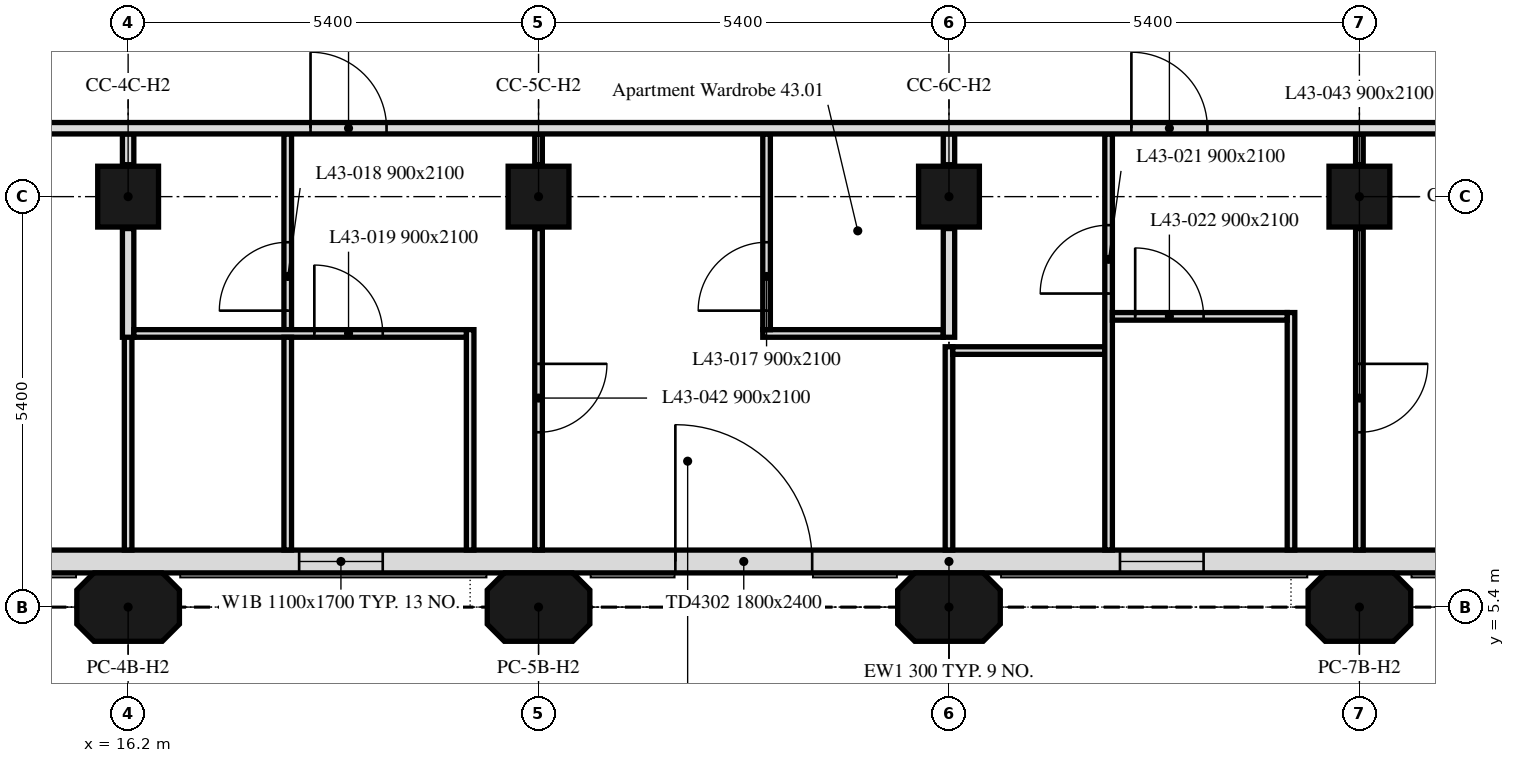
"""IFC4 building model, lengths in metres.
Left out: names, types, materials, properties, quantities, classifications, styles, units other than length and angle.
Written with IfcOpenShell. Run it as: python <this file> out.ifc"""

import sys

from ifc_helpers import new_model, si_unit, direction, frame, frame_2d, origin, origin_2d, place, context, subcontext, project, spatial, polyline, rectangle, outline, extrude, element, fill, save


model = new_model("IFC4")
c1 = context("Model", 3, precision=1e-05, world=origin(), true_north=direction((0.0, 1.0)))
c2 = subcontext(c1, "Body", "Model", "MODEL_VIEW")
j1 = project(units=[si_unit("LENGTHUNIT", "METRE"), si_unit("PLANEANGLEUNIT", "RADIAN")], contexts=[c1])
p1 = place(None, origin())
s1 = spatial("IfcSite", under=j1, at=p1, CompositionType="ELEMENT")
p2 = place(p1, origin())
s2 = spatial("IfcBuilding", under=s1, at=p2, CompositionType="ELEMENT")
p3 = place(p2, frame((0.0, 0.0, 180.7)))
s3 = spatial("IfcBuildingStorey", under=s2, at=p3, CompositionType="ELEMENT", Elevation=180.7)
for number, where, z_axis, x_axis in (
    (1, (16.2, 5.4, 0.0), (0.0, 0.0, 1.0), (1.0, 0.0, 0.0)),
    (2, (21.6, 5.4, 0.0), (0.0, 0.0, 1.0), (1.0, 0.0, 0.0)),
    (3, (27.0, 5.4, 0.0), (0.0, 0.0, 1.0), (1.0, 0.0, 0.0)),
    (4, (32.4, 5.4, 0.0), (0.0, 0.0, 1.0), (1.0, 0.0, 0.0)),
):
    element("IfcColumn", number, at=place(p3, frame(where, z_axis=z_axis, x_axis=x_axis)), inside=s3, PredefinedType="COLUMN", context=c2, shape_type="SweptSolid", body=[
        extrude(outline(polyline([(-0.45, -0.45), (0.45, -0.45), (0.675, -0.225), (0.675, 0.225), (0.45, 0.45), (-0.45, 0.45), (-0.675, 0.225), (-0.675, -0.225), (-0.45, -0.45)])), origin(), (0.0, 0.0, 1.0), 3.0),
    ])
for number, where, z_axis, x_axis in (
    (5, (16.2, 10.8, 0.0), (0.0, 0.0, 1.0), (1.0, 0.0, 0.0)),
    (6, (21.6, 10.8, 0.0), (0.0, 0.0, 1.0), (1.0, 0.0, 0.0)),
    (7, (27.0, 10.8, 0.0), (0.0, 0.0, 1.0), (1.0, 0.0, 0.0)),
    (8, (32.4, 10.8, 0.0), (0.0, 0.0, 1.0), (1.0, 0.0, 0.0)),
):
    element("IfcColumn", number, at=place(p3, frame(where, z_axis=z_axis, x_axis=x_axis)), inside=s3, PredefinedType="COLUMN", context=c2, shape_type="SweptSolid", body=[
        extrude(rectangle(XDim=0.8, YDim=0.8, at=origin_2d()), origin(), (0.0, 0.0, 1.0), 3.0),
    ])
p4 = place(p3, frame((10.986, 6.0, 0.0), z_axis=(0.0, 0.0, 1.0), x_axis=(1.0, 0.0, 0.0)))
e9 = element("IfcWall", 9, at=p4, inside=s3, PredefinedType="SOLIDWALL", context=c2, shape_type="SweptSolid", body=[
    extrude(rectangle(XDim=32.027, YDim=0.3, at=frame_2d((16.014, 0.0))), origin(), (0.0, 0.0, 1.0), 3.0),
])
p5 = place(p4, frame((1.614, 0.0, 0.0)))
e10 = element("IfcOpeningElement", 10, at=p5, cuts=e9, PredefinedType="OPENING", context=c2, shape_type="SweptSolid", body=[
    extrude(rectangle(XDim=1.8, YDim=2.4, at=frame_2d((0.9, 1.2))), frame((0.0, 0.16, 0.0), z_axis=(0.0, -1.0, 0.0), x_axis=(1.0, 0.0, 0.0)), (0.0, 0.0, 1.0), 0.32),
])
p6 = place(p4, frame((12.414, 0.0, 0.0)))
e11 = element("IfcOpeningElement", 11, at=p6, cuts=e9, PredefinedType="OPENING", context=c2, shape_type="SweptSolid", body=[
    extrude(rectangle(XDim=1.8, YDim=2.4, at=frame_2d((0.9, 1.2))), frame((0.0, 0.16, 0.0), z_axis=(0.0, -1.0, 0.0), x_axis=(1.0, 0.0, 0.0)), (0.0, 0.0, 1.0), 0.32),
])
p7 = place(p4, frame((23.214, 0.0, 0.0)))
e12 = element("IfcOpeningElement", 12, at=p7, cuts=e9, PredefinedType="OPENING", context=c2, shape_type="SweptSolid", body=[
    extrude(rectangle(XDim=1.8, YDim=2.4, at=frame_2d((0.9, 1.2))), frame((0.0, 0.16, 0.0), z_axis=(0.0, -1.0, 0.0), x_axis=(1.0, 0.0, 0.0)), (0.0, 0.0, 1.0), 0.32),
])
p8 = place(p4, frame((28.614, 0.0, 0.0)))
e13 = element("IfcOpeningElement", 13, at=p8, cuts=e9, PredefinedType="OPENING", context=c2, shape_type="SweptSolid", body=[
    extrude(rectangle(XDim=1.8, YDim=2.4, at=frame_2d((0.9, 1.2))), frame((0.0, 0.16, 0.0), z_axis=(0.0, -1.0, 0.0), x_axis=(1.0, 0.0, 0.0)), (0.0, 0.0, 1.0), 0.32),
])
p9 = place(p4, frame((7.464, 0.0, 0.9)))
e14 = element("IfcOpeningElement", 14, at=p9, cuts=e9, PredefinedType="OPENING", context=c2, shape_type="SweptSolid", body=[
    extrude(rectangle(XDim=1.1, YDim=1.7, at=frame_2d((0.55, 0.85))), frame((0.0, 0.16, 0.0), z_axis=(0.0, -1.0, 0.0), x_axis=(1.0, 0.0, 0.0)), (0.0, 0.0, 1.0), 0.32),
])
p10 = place(p4, frame((18.264, 0.0, 0.9)))
e15 = element("IfcOpeningElement", 15, at=p10, cuts=e9, PredefinedType="OPENING", context=c2, shape_type="SweptSolid", body=[
    extrude(rectangle(XDim=1.1, YDim=1.7, at=frame_2d((0.55, 0.85))), frame((0.0, 0.16, 0.0), z_axis=(0.0, -1.0, 0.0), x_axis=(1.0, 0.0, 0.0)), (0.0, 0.0, 1.0), 0.32),
])
p11 = place(p3, frame((16.2, 6.151, 0.0), z_axis=(0.0, 0.0, 1.0), x_axis=(0.0, 1.0, 0.0)))
e16 = element("IfcWall", 16, at=p11, inside=s3, PredefinedType="PARTITIONING", context=c2, shape_type="SweptSolid", body=[
    extrude(rectangle(XDim=2.899, YDim=0.1, at=frame_2d((1.45, 0.0))), origin(), (0.0, 0.0, 1.0), 3.0),
])
p12 = place(p3, frame((16.2, 8.95, 0.0), z_axis=(0.0, 0.0, 1.0), x_axis=(0.0, 1.0, 0.0)))
e17 = element("IfcWall", 17, at=p12, inside=s3, PredefinedType="PARTITIONING", context=c2, shape_type="SweptSolid", body=[
    extrude(rectangle(XDim=1.43, YDim=0.15, at=frame_2d((0.715, 0.0))), origin(), (0.0, 0.0, 1.0), 3.0),
])
p13 = place(p3, frame((16.2, 11.22, 0.0), z_axis=(0.0, 0.0, 1.0), x_axis=(0.0, 1.0, 0.0)))
e18 = element("IfcWall", 18, at=p13, inside=s3, PredefinedType="PARTITIONING", context=c2, shape_type="SweptSolid", body=[
    extrude(rectangle(XDim=0.405, YDim=0.15, at=frame_2d((0.203, 0.0))), origin(), (0.0, 0.0, 1.0), 3.0),
])
p14 = place(p3, frame((21.6, 11.625, 0.0), z_axis=(0.0, 0.0, 1.0), x_axis=(0.0, -1.0, 0.0)))
e19 = element("IfcWall", 19, at=p14, inside=s3, PredefinedType="PARTITIONING", context=c2, shape_type="SweptSolid", body=[
    extrude(rectangle(XDim=0.405, YDim=0.1, at=frame_2d((0.203, 0.0))), origin(), (0.0, 0.0, 1.0), 3.0),
])
p15 = place(p3, frame((21.6, 10.38, 0.0), z_axis=(0.0, 0.0, 1.0), x_axis=(0.0, -1.0, 0.0)))
e20 = element("IfcWall", 20, at=p15, inside=s3, PredefinedType="PARTITIONING", context=c2, shape_type="SweptSolid", body=[
    extrude(rectangle(XDim=4.229, YDim=0.1, at=frame_2d((2.115, 0.0))), origin(), (0.0, 0.0, 1.0), 3.0),
])
p16 = place(p15, frame((1.78, 0.0, 0.0)))
e21 = element("IfcOpeningElement", 21, at=p16, cuts=e20, PredefinedType="OPENING", context=c2, shape_type="SweptSolid", body=[
    extrude(rectangle(XDim=0.9, YDim=2.1, at=frame_2d((0.45, 1.05))), frame((0.0, 0.05, 0.0), z_axis=(0.0, -1.0, 0.0), x_axis=(1.0, 0.0, 0.0)), (0.0, 0.0, 1.0), 0.1),
])
p17 = place(p3, frame((27.0, 6.151, 0.0), z_axis=(0.0, 0.0, 1.0), x_axis=(0.0, 1.0, 0.0)))
e22 = element("IfcWall", 22, at=p17, inside=s3, PredefinedType="PARTITIONING", context=c2, shape_type="SweptSolid", body=[
    extrude(rectangle(XDim=2.674, YDim=0.1, at=frame_2d((1.337, 0.0))), origin(), (0.0, 0.0, 1.0), 3.0),
])
p18 = place(p3, frame((26.925, 9.0, 0.0), z_axis=(0.0, 0.0, 1.0), x_axis=(-1.0, 0.0, 0.0)))
e23 = element("IfcWall", 23, at=p18, inside=s3, PredefinedType="PARTITIONING", context=c2, shape_type="SweptSolid", body=[
    extrude(rectangle(XDim=2.375, YDim=0.1, at=frame_2d((1.188, 0.0))), origin(), (0.0, 0.0, 1.0), 3.0),
])
p19 = place(p3, frame((24.6, 9.05, 0.0), z_axis=(0.0, 0.0, 1.0), x_axis=(0.0, 1.0, 0.0)))
e24 = element("IfcWall", 24, at=p19, inside=s3, PredefinedType="PARTITIONING", context=c2, shape_type="SweptSolid", body=[
    extrude(rectangle(XDim=2.575, YDim=0.1, at=frame_2d((1.288, 0.0))), origin(), (0.0, 0.0, 1.0), 3.0),
])
p20 = place(p19, frame((0.25, 0.0, 0.0)))
e25 = element("IfcOpeningElement", 25, at=p20, cuts=e24, PredefinedType="OPENING", context=c2, shape_type="SweptSolid", body=[
    extrude(rectangle(XDim=0.9, YDim=2.1, at=frame_2d((0.45, 1.05))), frame((0.0, 0.05, 0.0), z_axis=(0.0, -1.0, 0.0), x_axis=(1.0, 0.0, 0.0)), (0.0, 0.0, 1.0), 0.1),
])
p21 = place(p3, frame((18.3, 9.05, 0.0), z_axis=(0.0, 0.0, 1.0), x_axis=(0.0, 1.0, 0.0)))
e26 = element("IfcWall", 26, at=p21, inside=s3, PredefinedType="PARTITIONING", context=c2, shape_type="SweptSolid", body=[
    extrude(rectangle(XDim=2.575, YDim=0.1, at=frame_2d((1.288, 0.0))), origin(), (0.0, 0.0, 1.0), 3.0),
])
p22 = place(p21, frame((0.25, 0.0, 0.0)))
e27 = element("IfcOpeningElement", 27, at=p22, cuts=e26, PredefinedType="OPENING", context=c2, shape_type="SweptSolid", body=[
    extrude(rectangle(XDim=0.9, YDim=2.1, at=frame_2d((0.45, 1.05))), frame((0.0, 0.05, 0.0), z_axis=(0.0, -1.0, 0.0), x_axis=(1.0, 0.0, 0.0)), (0.0, 0.0, 1.0), 0.1),
])
p23 = place(p3, frame((20.7, 9.05, 0.0), z_axis=(0.0, 0.0, 1.0), x_axis=(0.0, -1.0, 0.0)))
e28 = element("IfcWall", 28, at=p23, inside=s3, PredefinedType="PARTITIONING", context=c2, shape_type="SweptSolid", body=[
    extrude(rectangle(XDim=2.899, YDim=0.1, at=frame_2d((1.45, 0.0))), origin(), (0.0, 0.0, 1.0), 3.0),
])
p24 = place(p3, frame((16.275, 9.0, 0.0), z_axis=(0.0, 0.0, 1.0), x_axis=(1.0, 0.0, 0.0)))
e29 = element("IfcWall", 29, at=p24, inside=s3, PredefinedType="PARTITIONING", context=c2, shape_type="SweptSolid", body=[
    extrude(rectangle(XDim=4.375, YDim=0.1, at=frame_2d((2.188, 0.0))), origin(), (0.0, 0.0, 1.0), 3.0),
])
p25 = place(p24, frame((2.375, 0.0, 0.0)))
e30 = element("IfcOpeningElement", 30, at=p25, cuts=e29, PredefinedType="OPENING", context=c2, shape_type="SweptSolid", body=[
    extrude(rectangle(XDim=0.9, YDim=2.1, at=frame_2d((0.45, 1.05))), frame((0.0, 0.05, 0.0), z_axis=(0.0, -1.0, 0.0), x_axis=(1.0, 0.0, 0.0)), (0.0, 0.0, 1.0), 0.1),
])
p26 = place(p3, frame((27.0, 8.95, 0.0), z_axis=(0.0, 0.0, 1.0), x_axis=(0.0, 1.0, 0.0)))
e31 = element("IfcWall", 31, at=p26, inside=s3, PredefinedType="PARTITIONING", context=c2, shape_type="SweptSolid", body=[
    extrude(rectangle(XDim=1.43, YDim=0.15, at=frame_2d((0.715, 0.0))), origin(), (0.0, 0.0, 1.0), 3.0),
])
p27 = place(p3, frame((27.0, 11.22, 0.0), z_axis=(0.0, 0.0, 1.0), x_axis=(0.0, 1.0, 0.0)))
e32 = element("IfcWall", 32, at=p27, inside=s3, PredefinedType="PARTITIONING", context=c2, shape_type="SweptSolid", body=[
    extrude(rectangle(XDim=0.405, YDim=0.15, at=frame_2d((0.203, 0.0))), origin(), (0.0, 0.0, 1.0), 3.0),
])
p28 = place(p3, frame((18.3, 8.95, 0.0), z_axis=(0.0, 0.0, 1.0), x_axis=(0.0, -1.0, 0.0)))
e33 = element("IfcWall", 33, at=p28, inside=s3, PredefinedType="PARTITIONING", context=c2, shape_type="SweptSolid", body=[
    extrude(rectangle(XDim=2.799, YDim=0.1, at=frame_2d((1.399, 0.0))), origin(), (0.0, 0.0, 1.0), 3.0),
])
p29 = place(p3, frame((32.4, 11.625, 0.0), z_axis=(0.0, 0.0, 1.0), x_axis=(0.0, -1.0, 0.0)))
e34 = element("IfcWall", 34, at=p29, inside=s3, PredefinedType="PARTITIONING", context=c2, shape_type="SweptSolid", body=[
    extrude(rectangle(XDim=0.405, YDim=0.1, at=frame_2d((0.203, 0.0))), origin(), (0.0, 0.0, 1.0), 3.0),
])
p30 = place(p3, frame((32.4, 10.38, 0.0), z_axis=(0.0, 0.0, 1.0), x_axis=(0.0, -1.0, 0.0)))
e35 = element("IfcWall", 35, at=p30, inside=s3, PredefinedType="PARTITIONING", context=c2, shape_type="SweptSolid", body=[
    extrude(rectangle(XDim=4.229, YDim=0.1, at=frame_2d((2.115, 0.0))), origin(), (0.0, 0.0, 1.0), 3.0),
])
p31 = place(p30, frame((1.78, 0.0, 0.0)))
e36 = element("IfcOpeningElement", 36, at=p31, cuts=e35, PredefinedType="OPENING", context=c2, shape_type="SweptSolid", body=[
    extrude(rectangle(XDim=0.9, YDim=2.1, at=frame_2d((0.45, 1.05))), frame((0.0, 0.05, 0.0), z_axis=(0.0, -1.0, 0.0), x_axis=(1.0, 0.0, 0.0)), (0.0, 0.0, 1.0), 0.1),
])
p32 = place(p3, frame((27.05, 8.775, 0.0), z_axis=(0.0, 0.0, 1.0), x_axis=(1.0, 0.0, 0.0)))
e37 = element("IfcWall", 37, at=p32, inside=s3, PredefinedType="PARTITIONING", context=c2, shape_type="SweptSolid", body=[
    extrude(rectangle(XDim=2.0, YDim=0.1, at=frame_2d((1.0, 0.0))), origin(), (0.0, 0.0, 1.0), 3.0),
])
p33 = place(p3, frame((29.1, 6.151, 0.0), z_axis=(0.0, 0.0, 1.0), x_axis=(0.0, 1.0, 0.0)))
e38 = element("IfcWall", 38, at=p33, inside=s3, PredefinedType="PARTITIONING", context=c2, shape_type="SweptSolid", body=[
    extrude(rectangle(XDim=5.474, YDim=0.1, at=frame_2d((2.737, 0.0))), origin(), (0.0, 0.0, 1.0), 3.0),
])
p34 = place(p33, frame((3.374, 0.0, 0.0)))
e39 = element("IfcOpeningElement", 39, at=p34, cuts=e38, PredefinedType="OPENING", context=c2, shape_type="SweptSolid", body=[
    extrude(rectangle(XDim=0.9, YDim=2.1, at=frame_2d((0.45, 1.05))), frame((0.0, 0.05, 0.0), z_axis=(0.0, -1.0, 0.0), x_axis=(1.0, 0.0, 0.0)), (0.0, 0.0, 1.0), 0.1),
])
p35 = place(p3, frame((31.5, 9.275, 0.0), z_axis=(0.0, 0.0, 1.0), x_axis=(0.0, -1.0, 0.0)))
e40 = element("IfcWall", 40, at=p35, inside=s3, PredefinedType="PARTITIONING", context=c2, shape_type="SweptSolid", body=[
    extrude(rectangle(XDim=3.124, YDim=0.1, at=frame_2d((1.562, 0.0))), origin(), (0.0, 0.0, 1.0), 3.0),
])
p36 = place(p3, frame((29.15, 9.225, 0.0), z_axis=(0.0, 0.0, 1.0), x_axis=(1.0, 0.0, 0.0)))
e41 = element("IfcWall", 41, at=p36, inside=s3, PredefinedType="PARTITIONING", context=c2, shape_type="SweptSolid", body=[
    extrude(rectangle(XDim=2.3, YDim=0.1, at=frame_2d((1.15, 0.0))), origin(), (0.0, 0.0, 1.0), 3.0),
])
p37 = place(p36, frame((0.3, 0.0, 0.0)))
e42 = element("IfcOpeningElement", 42, at=p37, cuts=e41, PredefinedType="OPENING", context=c2, shape_type="SweptSolid", body=[
    extrude(rectangle(XDim=0.9, YDim=2.1, at=frame_2d((0.45, 1.05))), frame((0.0, 0.05, 0.0), z_axis=(0.0, -1.0, 0.0), x_axis=(1.0, 0.0, 0.0)), (0.0, 0.0, 1.0), 0.1),
])
p38 = place(p3, frame((6.151, 11.7, 0.0), z_axis=(0.0, 0.0, 1.0), x_axis=(1.0, 0.0, 0.0)))
e43 = element("IfcWall", 43, at=p38, inside=s3, PredefinedType="PARTITIONING", context=c2, shape_type="SweptSolid", body=[
    extrude(rectangle(XDim=41.698, YDim=0.15, at=frame_2d((20.849, 0.0))), origin(), (0.0, 0.0, 1.0), 3.0),
])
p39 = place(p38, frame((1.449, 0.0, 0.0)))
e44 = element("IfcOpeningElement", 44, at=p39, cuts=e43, PredefinedType="OPENING", context=c2, shape_type="SweptSolid", body=[
    extrude(rectangle(XDim=1.0, YDim=2.1, at=frame_2d((0.5, 1.05))), frame((0.0, 0.075, 0.0), z_axis=(0.0, -1.0, 0.0), x_axis=(1.0, 0.0, 0.0)), (0.0, 0.0, 1.0), 0.15),
])
p40 = place(p38, frame((37.954, 0.0, 0.0)))
e45 = element("IfcOpeningElement", 45, at=p40, cuts=e43, PredefinedType="OPENING", context=c2, shape_type="SweptSolid", body=[
    extrude(rectangle(XDim=1.0, YDim=2.1, at=frame_2d((0.5, 1.05))), frame((0.0, 0.075, 0.0), z_axis=(0.0, -1.0, 0.0), x_axis=(1.0, 0.0, 0.0)), (0.0, 0.0, 1.0), 0.15),
])
p41 = place(p38, frame((12.449, 0.0, 0.0)))
e46 = element("IfcOpeningElement", 46, at=p41, cuts=e43, PredefinedType="OPENING", context=c2, shape_type="SweptSolid", body=[
    extrude(rectangle(XDim=1.0, YDim=2.1, at=frame_2d((0.5, 1.05))), frame((0.0, 0.075, 0.0), z_axis=(0.0, -1.0, 0.0), x_axis=(1.0, 0.0, 0.0)), (0.0, 0.0, 1.0), 0.15),
])
p42 = place(p38, frame((23.249, 0.0, 0.0)))
e47 = element("IfcOpeningElement", 47, at=p42, cuts=e43, PredefinedType="OPENING", context=c2, shape_type="SweptSolid", body=[
    extrude(rectangle(XDim=1.0, YDim=2.1, at=frame_2d((0.5, 1.05))), frame((0.0, 0.075, 0.0), z_axis=(0.0, -1.0, 0.0), x_axis=(1.0, 0.0, 0.0)), (0.0, 0.0, 1.0), 0.15),
])
p43 = place(p6, origin())
e48 = element("IfcDoor", 48, at=p43, inside=s3, OperationType="DOUBLE_DOOR_DOUBLE_SWING", PredefinedType="DOOR", context=c2, shape_type="SweptSolid", body=[
    extrude(rectangle(XDim=1.8, YDim=2.4, at=frame_2d((0.9, 1.2))), frame((0.0, 0.025, 0.0), z_axis=(0.0, -1.0, 0.0), x_axis=(1.0, 0.0, 0.0)), (0.0, 0.0, 1.0), 0.05),
])
fill(e11, e48)
p44 = place(p9, origin())
e49 = element("IfcWindow", 49, at=p44, inside=s3, PartitioningType="SINGLE_PANEL", PredefinedType="WINDOW", context=c2, shape_type="SweptSolid", body=[
    extrude(rectangle(XDim=1.1, YDim=1.7, at=frame_2d((0.55, 0.85))), frame((0.0, 0.03, 0.0), z_axis=(0.0, -1.0, 0.0), x_axis=(1.0, 0.0, 0.0)), (0.0, 0.0, 1.0), 0.06),
])
fill(e14, e49)
p45 = place(p10, origin())
e50 = element("IfcWindow", 50, at=p45, inside=s3, PartitioningType="SINGLE_PANEL", PredefinedType="WINDOW", context=c2, shape_type="SweptSolid", body=[
    extrude(rectangle(XDim=1.1, YDim=1.7, at=frame_2d((0.55, 0.85))), frame((0.0, 0.03, 0.0), z_axis=(0.0, -1.0, 0.0), x_axis=(1.0, 0.0, 0.0)), (0.0, 0.0, 1.0), 0.06),
])
fill(e15, e50)
p46 = place(p20, origin())
e51 = element("IfcDoor", 51, at=p46, inside=s3, OperationType="SINGLE_SWING_RIGHT", PredefinedType="DOOR", context=c2, shape_type="SweptSolid", body=[
    extrude(rectangle(XDim=0.9, YDim=2.1, at=frame_2d((0.45, 1.05))), frame((0.0, 0.025, 0.0), z_axis=(0.0, -1.0, 0.0), x_axis=(1.0, 0.0, 0.0)), (0.0, 0.0, 1.0), 0.05),
])
fill(e25, e51)
p47 = place(p22, origin())
e52 = element("IfcDoor", 52, at=p47, inside=s3, OperationType="SINGLE_SWING_LEFT", PredefinedType="DOOR", context=c2, shape_type="SweptSolid", body=[
    extrude(rectangle(XDim=0.9, YDim=2.1, at=frame_2d((0.45, 1.05))), frame((0.0, 0.025, 0.0), z_axis=(0.0, -1.0, 0.0), x_axis=(1.0, 0.0, 0.0)), (0.0, 0.0, 1.0), 0.05),
])
fill(e27, e52)
p48 = place(p25, origin())
e53 = element("IfcDoor", 53, at=p48, inside=s3, OperationType="SINGLE_SWING_RIGHT", PredefinedType="DOOR", context=c2, shape_type="SweptSolid", body=[
    extrude(rectangle(XDim=0.9, YDim=2.1, at=frame_2d((0.45, 1.05))), frame((0.0, 0.025, 0.0), z_axis=(0.0, -1.0, 0.0), x_axis=(1.0, 0.0, 0.0)), (0.0, 0.0, 1.0), 0.05),
])
fill(e30, e53)
p49 = place(p34, origin())
e54 = element("IfcDoor", 54, at=p49, inside=s3, OperationType="SINGLE_SWING_RIGHT", PredefinedType="DOOR", context=c2, shape_type="SweptSolid", body=[
    extrude(rectangle(XDim=0.9, YDim=2.1, at=frame_2d((0.45, 1.05))), frame((0.0, 0.025, 0.0), z_axis=(0.0, -1.0, 0.0), x_axis=(1.0, 0.0, 0.0)), (0.0, 0.0, 1.0), 0.05),
])
fill(e39, e54)
p50 = place(p37, origin())
e55 = element("IfcDoor", 55, at=p50, inside=s3, OperationType="SINGLE_SWING_LEFT", PredefinedType="DOOR", context=c2, shape_type="SweptSolid", body=[
    extrude(rectangle(XDim=0.9, YDim=2.1, at=frame_2d((0.45, 1.05))), frame((0.0, 0.025, 0.0), z_axis=(0.0, -1.0, 0.0), x_axis=(1.0, 0.0, 0.0)), (0.0, 0.0, 1.0), 0.05),
])
fill(e42, e55)
p51 = place(p16, origin())
e56 = element("IfcDoor", 56, at=p51, inside=s3, OperationType="SINGLE_SWING_LEFT", PredefinedType="DOOR", context=c2, shape_type="SweptSolid", body=[
    extrude(rectangle(XDim=0.9, YDim=2.1, at=frame_2d((0.45, 1.05))), frame((0.0, 0.025, 0.0), z_axis=(0.0, -1.0, 0.0), x_axis=(1.0, 0.0, 0.0)), (0.0, 0.0, 1.0), 0.05),
])
fill(e21, e56)
p52 = place(p31, origin())
e57 = element("IfcDoor", 57, at=p52, inside=s3, OperationType="SINGLE_SWING_RIGHT", PredefinedType="DOOR", context=c2, shape_type="SweptSolid", body=[
    extrude(rectangle(XDim=0.9, YDim=2.1, at=frame_2d((0.45, 1.05))), frame((0.0, 0.025, 0.0), z_axis=(0.0, -1.0, 0.0), x_axis=(1.0, 0.0, 0.0)), (0.0, 0.0, 1.0), 0.05),
])
fill(e36, e57)
p53 = place(p41, origin())
e58 = element("IfcDoor", 58, at=p53, inside=s3, OperationType="SINGLE_SWING_LEFT", PredefinedType="DOOR", context=c2, shape_type="SweptSolid", body=[
    extrude(rectangle(XDim=1.0, YDim=2.1, at=frame_2d((0.5, 1.05))), frame((0.0, 0.025, 0.0), z_axis=(0.0, -1.0, 0.0), x_axis=(1.0, 0.0, 0.0)), (0.0, 0.0, 1.0), 0.05),
])
fill(e46, e58)
p54 = place(p42, origin())
e59 = element("IfcDoor", 59, at=p54, inside=s3, OperationType="SINGLE_SWING_LEFT", PredefinedType="DOOR", context=c2, shape_type="SweptSolid", body=[
    extrude(rectangle(XDim=1.0, YDim=2.1, at=frame_2d((0.5, 1.05))), frame((0.0, 0.025, 0.0), z_axis=(0.0, -1.0, 0.0), x_axis=(1.0, 0.0, 0.0)), (0.0, 0.0, 1.0), 0.05),
])
fill(e47, e59)
save(model, sys.argv[1])
